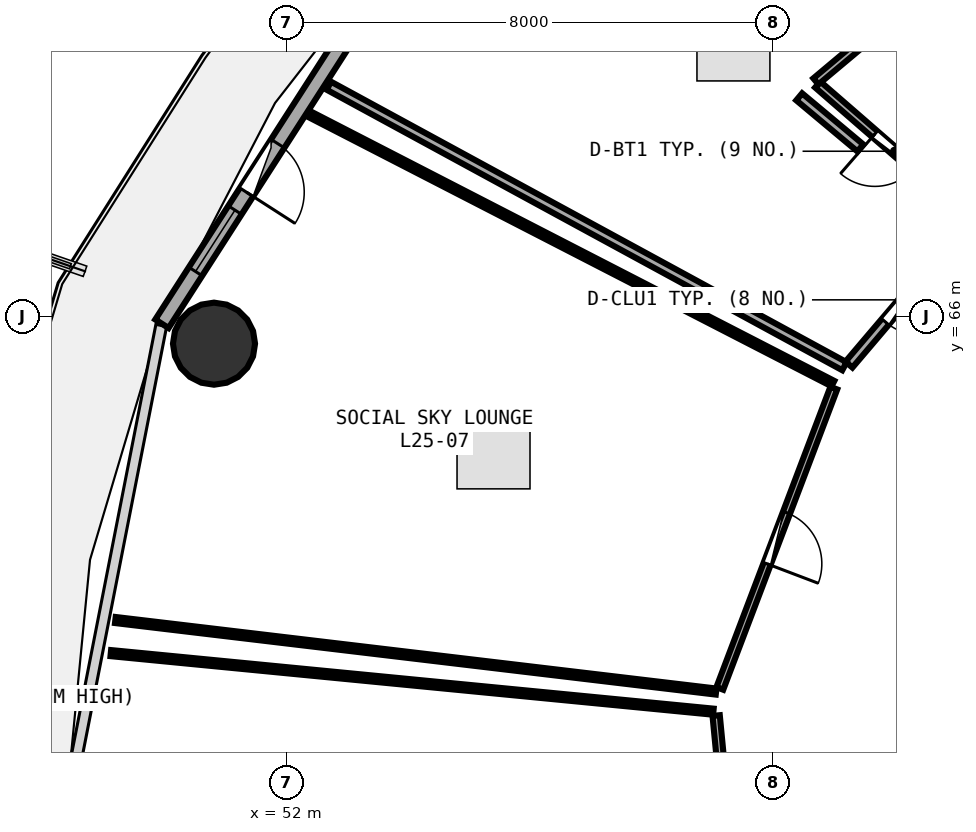
"""IFC4 building model, lengths in metres.
Left out: names, types, materials, properties, quantities, classifications, styles, units other than length and angle.
Written with IfcOpenShell. Run it as: python <this file> out.ifc"""

import sys

from ifc_helpers import new_model, si_unit, direction, frame, frame_2d, origin, origin_2d, place, context, subcontext, project, spatial, rectangle, circle, extrude, element, fill, save


model = new_model("IFC4")
c1 = context("Model", 3, precision=1e-05, world=origin(), true_north=direction((0.0, 1.0)))
c2 = subcontext(c1, "Body", "Model", "MODEL_VIEW")
j1 = project(units=[si_unit("LENGTHUNIT", "METRE"), si_unit("PLANEANGLEUNIT", "RADIAN")], contexts=[c1])
p1 = place(None, origin())
s1 = spatial("IfcSite", under=j1, at=p1, CompositionType="ELEMENT")
p2 = place(p1, origin())
s2 = spatial("IfcBuilding", under=s1, at=p2, CompositionType="ELEMENT")
p3 = place(p2, frame((0.0, 0.0, 98.85)))
s3 = spatial("IfcBuildingStorey", under=s2, at=p3, CompositionType="ELEMENT", Elevation=98.85)
p4 = place(p3, frame((50.808, 65.552, 0.0), z_axis=(0.0, 0.0, 1.0), x_axis=(1.0, 0.0, 0.0)))
e1 = element("IfcColumn", 1, at=p4, inside=s3, PredefinedType="COLUMN", context=c2, shape_type="SweptSolid", body=[
    extrude(circle(Radius=0.675, at=origin_2d()), origin(), (0.0, 0.0, 1.0), 3.75),
])
p5 = place(p3, frame((54.381, 72.771, 0.0), z_axis=(0.0, 0.0, 1.0), x_axis=(-0.540620528459, -0.841266571432, 0.0)))
e2 = element("IfcWall", 2, at=p5, inside=s3, PredefinedType="SOLIDWALL", context=c2, shape_type="SweptSolid", body=[
    extrude(rectangle(XDim=8.193, YDim=0.26, at=frame_2d((4.096, 0.0))), origin(), (0.0, 0.0, 1.0), 3.475),
])
p6 = place(p5, frame((4.671, 0.0, 0.0)))
e3 = element("IfcOpeningElement", 3, at=p6, cuts=e2, PredefinedType="OPENING", context=c2, shape_type="SweptSolid", body=[
    extrude(rectangle(XDim=0.95, YDim=2.1, at=frame_2d((0.475, 1.05))), frame((0.0, 0.14, 0.0), z_axis=(0.0, -1.0, 0.0), x_axis=(1.0, 0.0, 0.0)), (0.0, 0.0, 1.0), 0.28),
])
p7 = place(p5, frame((5.971, 0.0, 0.85)))
e4 = element("IfcOpeningElement", 4, at=p7, cuts=e2, PredefinedType="OPENING", context=c2, shape_type="SweptSolid", body=[
    extrude(rectangle(XDim=1.2, YDim=1.45, at=frame_2d((0.6, 0.725))), frame((0.0, 0.14, 0.0), z_axis=(0.0, -1.0, 0.0), x_axis=(1.0, 0.0, 0.0)), (0.0, 0.0, 1.0), 0.28),
])
p8 = place(p3, frame((63.264, 67.619, 0.0), z_axis=(0.0, 0.0, 1.0), x_axis=(-0.75497608509, 0.65575232439, 0.0)))
e5 = element("IfcWall", 5, at=p8, inside=s3, PredefinedType="PLUMBINGWALL", context=c2, shape_type="SweptSolid", body=[
    extrude(rectangle(XDim=3.346, YDim=0.13, at=frame_2d((1.673, 0.0))), origin(), (0.0, 0.0, 1.0), 3.235),
])
p9 = place(p8, frame((1.243, 0.0, 0.0)))
e6 = element("IfcOpeningElement", 6, at=p9, cuts=e5, PredefinedType="OPENING", context=c2, shape_type="SweptSolid", body=[
    extrude(rectangle(XDim=0.86, YDim=2.05, at=frame_2d((0.43, 1.025))), frame((0.0, 0.075, 0.0), z_axis=(0.0, -1.0, 0.0), x_axis=(1.0, 0.0, 0.0)), (0.0, 0.0, 1.0), 0.15),
])
p10 = place(p3, frame((63.06, 67.337, 0.0), z_axis=(0.0, 0.0, 1.0), x_axis=(-0.647519081114, -0.762049236988, 0.0)))
e7 = element("IfcWall", 7, at=p10, inside=s3, PredefinedType="PARTITIONING", context=c2, shape_type="SweptSolid", body=[
    extrude(rectangle(XDim=2.795, YDim=0.15, at=frame_2d((1.397, 0.0))), origin(), (0.0, 0.0, 1.0), 2.925),
])
p11 = place(p10, frame((0.922, 0.0, 0.0)))
e8 = element("IfcOpeningElement", 8, at=p11, cuts=e7, PredefinedType="OPENING", context=c2, shape_type="SweptSolid", body=[
    extrude(rectangle(XDim=0.95, YDim=2.08, at=frame_2d((0.475, 1.04))), frame((0.0, 0.085, 0.0), z_axis=(0.0, -1.0, 0.0), x_axis=(1.0, 0.0, 0.0)), (0.0, 0.0, 1.0), 0.17),
])
p12 = place(p3, frame((61.002, 64.821, 0.0), z_axis=(0.0, 0.0, 1.0), x_axis=(-0.354853458438, -0.934921934193, 0.0)))
e9 = element("IfcWall", 9, at=p12, inside=s3, PredefinedType="PARTITIONING", context=c2, shape_type="SweptSolid", body=[
    extrude(rectangle(XDim=5.282, YDim=0.12, at=frame_2d((2.641, 0.0))), origin(), (0.0, 0.0, 1.0), 3.235),
])
p13 = place(p12, frame((2.191, 0.0, 0.0)))
e10 = element("IfcOpeningElement", 10, at=p13, cuts=e9, PredefinedType="OPENING", context=c2, shape_type="SweptSolid", body=[
    extrude(rectangle(XDim=0.9, YDim=2.08, at=frame_2d((0.45, 1.04))), frame((0.0, 0.07, 0.0), z_axis=(0.0, -1.0, 0.0), x_axis=(1.0, 0.0, 0.0)), (0.0, 0.0, 1.0), 0.14),
])
p14 = place(p3, frame((59.067, 59.436, 0.0), z_axis=(0.0, 0.0, 1.0), x_axis=(0.095913591475, -0.995389663886, 0.0)))
e11 = element("IfcWall", 11, at=p14, inside=s3, PredefinedType="PARTITIONING", context=c2, shape_type="SweptSolid", body=[
    extrude(rectangle(XDim=5.226, YDim=0.12, at=frame_2d((2.613, 0.0))), origin(), (0.0, 0.0, 1.0), 2.925),
])
p15 = place(p14, frame((2.163, 0.0, 0.0)))
e12 = element("IfcOpeningElement", 12, at=p15, cuts=e11, PredefinedType="OPENING", context=c2, shape_type="SweptSolid", body=[
    extrude(rectangle(XDim=0.9, YDim=2.08, at=frame_2d((0.45, 1.04))), frame((0.0, 0.07, 0.0), z_axis=(0.0, -1.0, 0.0), x_axis=(1.0, 0.0, 0.0)), (0.0, 0.0, 1.0), 0.14),
])
p16 = place(p3, frame((65.506, 69.292, 0.0), z_axis=(0.0, 0.0, 1.0), x_axis=(-0.612364923916, 0.790575233585, 0.0)))
e13 = element("IfcWall", 13, at=p16, inside=s3, PredefinedType="PARTITIONING", context=c2, shape_type="SweptSolid", body=[
    extrude(rectangle(XDim=9.168, YDim=0.15, at=frame_2d((4.584, 0.0))), origin(), (0.0, 0.0, 1.0), 2.925),
])
p17 = place(p3, frame((60.707, 69.866, 0.0), z_axis=(0.0, 0.0, 1.0), x_axis=(0.766482767596, 0.642264872913, 0.0)))
e14 = element("IfcWall", 14, at=p17, inside=s3, PredefinedType="PLUMBINGWALL", context=c2, shape_type="SweptSolid", body=[
    extrude(rectangle(XDim=1.464, YDim=0.13, at=frame_2d((0.732, 0.0))), origin(), (0.0, 0.0, 1.0), 3.48),
])
p18 = place(p3, frame((61.177, 65.181, 0.0), z_axis=(0.0, 0.0, 1.0), x_axis=(-0.878445909545, 0.477841798092, 0.0)))
e15 = element("IfcWall", 15, at=p18, inside=s3, PredefinedType="PARTITIONING", context=c2, shape_type="SweptSolid", body=[
    extrude(rectangle(XDim=9.653, YDim=0.15, at=frame_2d((4.827, 0.0))), origin(), (0.0, 0.0, 1.0), 2.925),
])
p19 = place(p3, frame((60.433, 69.611, 0.0), z_axis=(0.0, 0.0, 1.0), x_axis=(0.767335111176, -0.641246307714, 0.0)))
e16 = element("IfcWall", 16, at=p19, inside=s3, PredefinedType="PARTITIONING", context=c2, shape_type="SweptSolid", body=[
    extrude(rectangle(XDim=1.311, YDim=0.15, at=frame_2d((0.655, 0.0))), origin(), (0.0, 0.0, 1.0), 3.48),
])
p20 = place(p3, frame((59.066, 59.831, 0.0), z_axis=(0.0, 0.0, 1.0), x_axis=(-0.99298532521, 0.118237658624, 0.0)))
e17 = element("IfcWall", 17, at=p20, inside=s3, PredefinedType="PARTITIONING", context=c2, shape_type="SweptSolid", body=[
    extrude(rectangle(XDim=9.95, YDim=0.1, at=frame_2d((4.975, 0.0))), origin(), (0.0, 0.0, 1.0), 2.975),
])
p21 = place(p3, frame((52.382, 69.324, 0.0), z_axis=(0.0, 0.0, 1.0), x_axis=(0.889175506344, -0.457566300025, 0.0)))
e18 = element("IfcWall", 18, at=p21, inside=s3, PredefinedType="PARTITIONING", context=c2, shape_type="SweptSolid", body=[
    extrude(rectangle(XDim=9.678, YDim=0.1, at=frame_2d((4.839, 0.0))), origin(), (0.0, 0.0, 1.0), 2.925),
])
p22 = place(p3, frame((49.111, 60.463, 0.0), z_axis=(0.0, 0.0, 1.0), x_axis=(0.995310801703, -0.096728527399, 0.0)))
e19 = element("IfcWall", 19, at=p22, inside=s3, PredefinedType="PARTITIONING", context=c2, shape_type="SweptSolid", body=[
    extrude(rectangle(XDim=9.957, YDim=0.1, at=frame_2d((4.979, 0.0))), origin(), (0.0, 0.0, 1.0), 2.975),
])
p23 = place(p6, frame((0.95, 0.0, 0.0), z_axis=(0.0, 0.0, 1.0), x_axis=(-1.0, 0.0, 0.0)))
e20 = element("IfcDoor", 20, at=p23, inside=s3, OperationType="SINGLE_SWING_LEFT", PredefinedType="DOOR", context=c2, shape_type="SweptSolid", body=[
    extrude(rectangle(XDim=0.95, YDim=2.1, at=frame_2d((0.475, 1.05))), frame((0.0, 0.025, 0.0), z_axis=(0.0, -1.0, 0.0), x_axis=(1.0, 0.0, 0.0)), (0.0, 0.0, 1.0), 0.05),
])
fill(e3, e20)
p24 = place(p7, origin())
e21 = element("IfcWindow", 21, at=p24, inside=s3, PartitioningType="SINGLE_PANEL", PredefinedType="WINDOW", context=c2, shape_type="SweptSolid", body=[
    extrude(rectangle(XDim=1.2, YDim=1.45, at=frame_2d((0.6, 0.725))), frame((0.0, 0.03, 0.0), z_axis=(0.0, -1.0, 0.0), x_axis=(1.0, 0.0, 0.0)), (0.0, 0.0, 1.0), 0.06),
])
fill(e4, e21)
p25 = place(p9, origin())
e22 = element("IfcDoor", 22, at=p25, inside=s3, OperationType="SINGLE_SWING_RIGHT", PredefinedType="DOOR", context=c2, shape_type="SweptSolid", body=[
    extrude(rectangle(XDim=0.86, YDim=2.05, at=frame_2d((0.43, 1.025))), frame((0.0, 0.025, 0.0), z_axis=(0.0, -1.0, 0.0), x_axis=(1.0, 0.0, 0.0)), (0.0, 0.0, 1.0), 0.05),
])
fill(e6, e22)
p26 = place(p11, origin())
e23 = element("IfcDoor", 23, at=p26, inside=s3, OperationType="SINGLE_SWING_LEFT", PredefinedType="DOOR", context=c2, shape_type="SweptSolid", body=[
    extrude(rectangle(XDim=0.95, YDim=2.08, at=frame_2d((0.475, 1.04))), frame((0.0, 0.025, 0.0), z_axis=(0.0, -1.0, 0.0), x_axis=(1.0, 0.0, 0.0)), (0.0, 0.0, 1.0), 0.05),
])
fill(e8, e23)
p27 = place(p13, origin())
e24 = element("IfcDoor", 24, at=p27, inside=s3, OperationType="SINGLE_SWING_RIGHT", PredefinedType="DOOR", context=c2, shape_type="SweptSolid", body=[
    extrude(rectangle(XDim=0.9, YDim=2.08, at=frame_2d((0.45, 1.04))), frame((0.0, 0.025, 0.0), z_axis=(0.0, -1.0, 0.0), x_axis=(1.0, 0.0, 0.0)), (0.0, 0.0, 1.0), 0.05),
])
fill(e10, e24)
save(model, sys.argv[1])
